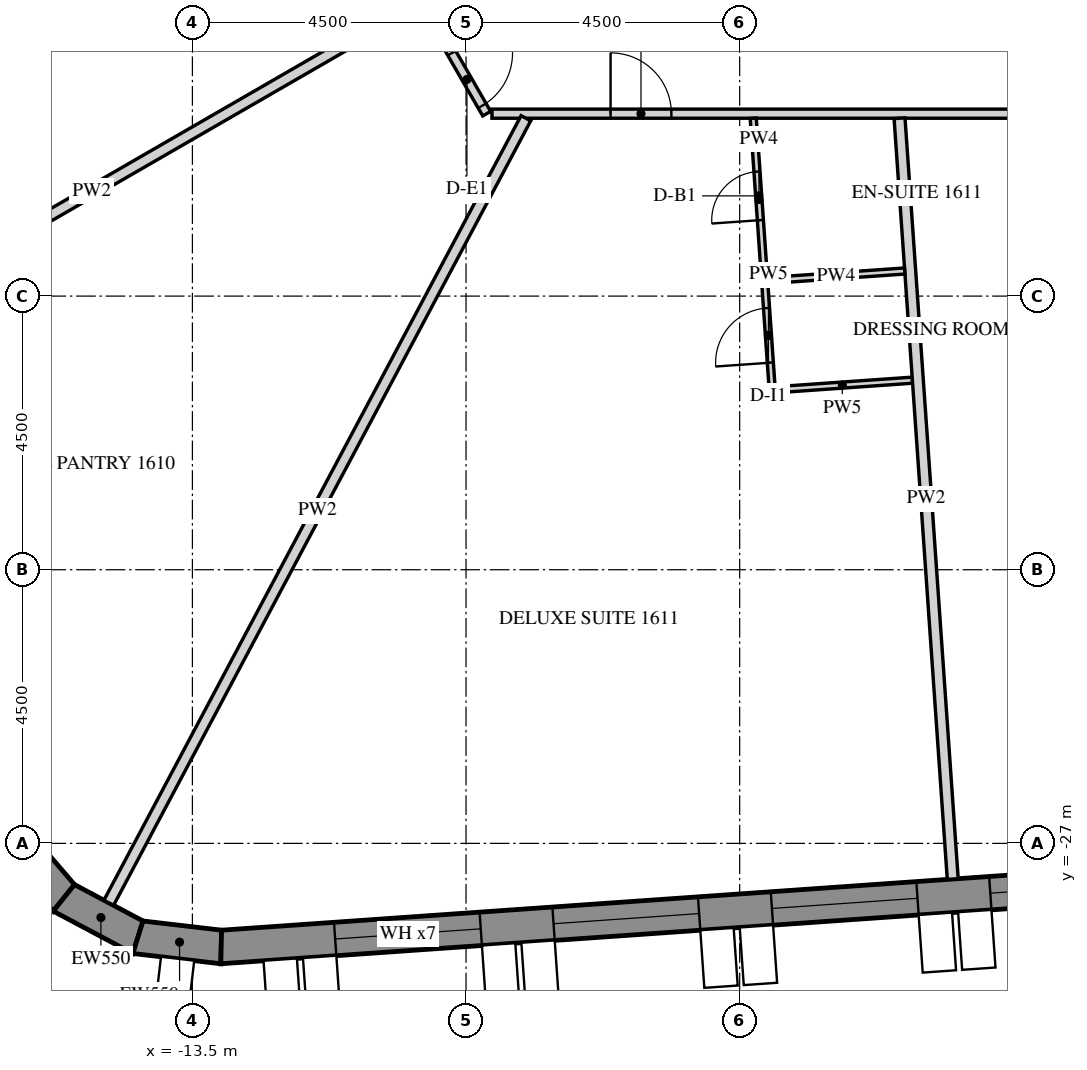
"""IFC4 building model, lengths in metres.
Left out: names, types, materials, properties, quantities, classifications, styles, units other than length and angle.
Written with IfcOpenShell. Run it as: python <this file> out.ifc"""

import sys

from ifc_helpers import new_model, si_unit, direction, frame, frame_2d, origin, place, context, subcontext, project, spatial, polyline, rectangle, outline, extrude, element, fill, save


model = new_model("IFC4")
c1 = context("Model", 3, precision=1e-05, world=origin(), true_north=direction((0.0, 1.0)))
c2 = subcontext(c1, "Body", "Model", "MODEL_VIEW")
j1 = project(units=[si_unit("LENGTHUNIT", "METRE"), si_unit("PLANEANGLEUNIT", "RADIAN")], contexts=[c1])
p1 = place(None, origin())
s1 = spatial("IfcSite", under=j1, at=p1, CompositionType="ELEMENT")
p2 = place(p1, origin())
s2 = spatial("IfcBuilding", under=s1, at=p2, CompositionType="ELEMENT")
p3 = place(p2, frame((0.0, 0.0, 207.3)))
s3 = spatial("IfcBuildingStorey", under=s2, at=p3, CompositionType="ELEMENT", Elevation=207.3)
p4 = place(p3, frame((-16.512, -26.85, -0.15), z_axis=(0.0, 0.0, 1.0), x_axis=(0.651621950847, -0.758543890078, 0.0)))
e1 = element("IfcWall", 1, at=p4, inside=s3, PredefinedType="SOLIDWALL", context=c2, shape_type="SweptSolid", body=[
    extrude(outline(polyline([(-0.026, -0.275), (1.431, -0.275), (1.327, 0.275), (0.026, 0.275), (-0.026, -0.275)])), origin(), (0.0, 0.0, 1.0), 3.9),
])
p5 = place(p3, frame((-15.614, -27.896, -0.15), z_axis=(0.0, 0.0, 1.0), x_axis=(0.882994189209, -0.469383917304, 0.0)))
e2 = element("IfcWall", 2, at=p5, inside=s3, PredefinedType="SOLIDWALL", context=c2, shape_type="SweptSolid", body=[
    extrude(outline(polyline([(-0.052, -0.275), (1.431, -0.275), (1.327, 0.275), (0.052, 0.275), (-0.052, -0.275)])), origin(), (0.0, 0.0, 1.0), 3.9),
])
p6 = place(p3, frame((-14.396, -28.543, -0.15), z_axis=(0.0, 0.0, 1.0), x_axis=(0.993232537394, -0.11614269956, 0.0)))
e3 = element("IfcWall", 3, at=p6, inside=s3, PredefinedType="SOLIDWALL", context=c2, shape_type="SweptSolid", body=[
    extrude(outline(polyline([(-0.052, -0.275), (1.405, -0.275), (1.353, 0.275), (0.052, 0.275), (-0.052, -0.275)])), origin(), (0.0, 0.0, 1.0), 3.9),
])
p7 = place(p3, frame((-13.026, -28.704, -0.15), z_axis=(0.0, 0.0, 1.0), x_axis=(0.99756406806, 0.069756219185, 0.0)))
e4 = element("IfcWall", 4, at=p7, inside=s3, PredefinedType="SOLIDWALL", context=c2, shape_type="SweptSolid", body=[
    extrude(outline(polyline([(-0.026, -0.275), (27.78, -0.275), (27.735, 0.275), (0.026, 0.275), (-0.026, -0.275)])), origin(), (0.0, 0.0, 1.0), 3.9),
])
p8 = place(p7, frame((1.879, 0.0, 1.05)))
e5 = element("IfcOpeningElement", 5, at=p8, cuts=e4, PredefinedType="OPENING", context=c2, shape_type="SweptSolid", body=[
    extrude(rectangle(XDim=2.4, YDim=2.4, at=frame_2d((1.2, 1.2))), frame((0.0, 0.285, 0.0), z_axis=(0.0, -1.0, 0.0), x_axis=(1.0, 0.0, 0.0)), (0.0, 0.0, 1.0), 0.57),
])
p9 = place(p7, frame((5.479, 0.0, 1.05)))
e6 = element("IfcOpeningElement", 6, at=p9, cuts=e4, PredefinedType="OPENING", context=c2, shape_type="SweptSolid", body=[
    extrude(rectangle(XDim=2.4, YDim=2.4, at=frame_2d((1.2, 1.2))), frame((0.0, 0.285, 0.0), z_axis=(0.0, -1.0, 0.0), x_axis=(1.0, 0.0, 0.0)), (0.0, 0.0, 1.0), 0.57),
])
p10 = place(p7, frame((9.079, 0.0, 1.05)))
e7 = element("IfcOpeningElement", 7, at=p10, cuts=e4, PredefinedType="OPENING", context=c2, shape_type="SweptSolid", body=[
    extrude(rectangle(XDim=2.4, YDim=2.4, at=frame_2d((1.2, 1.2))), frame((0.0, 0.285, 0.0), z_axis=(0.0, -1.0, 0.0), x_axis=(1.0, 0.0, 0.0)), (0.0, 0.0, 1.0), 0.57),
])
p11 = place(p7, frame((12.679, 0.0, 1.05)))
e8 = element("IfcOpeningElement", 8, at=p11, cuts=e4, PredefinedType="OPENING", context=c2, shape_type="SweptSolid", body=[
    extrude(rectangle(XDim=2.4, YDim=2.4, at=frame_2d((1.2, 1.2))), frame((0.0, 0.285, 0.0), z_axis=(0.0, -1.0, 0.0), x_axis=(1.0, 0.0, 0.0)), (0.0, 0.0, 1.0), 0.57),
])
p12 = place(p7, frame((16.279, 0.0, 1.05)))
e9 = element("IfcOpeningElement", 9, at=p12, cuts=e4, PredefinedType="OPENING", context=c2, shape_type="SweptSolid", body=[
    extrude(rectangle(XDim=2.4, YDim=2.4, at=frame_2d((1.2, 1.2))), frame((0.0, 0.285, 0.0), z_axis=(0.0, -1.0, 0.0), x_axis=(1.0, 0.0, 0.0)), (0.0, 0.0, 1.0), 0.57),
])
p13 = place(p7, frame((19.879, 0.0, 1.05)))
e10 = element("IfcOpeningElement", 10, at=p13, cuts=e4, PredefinedType="OPENING", context=c2, shape_type="SweptSolid", body=[
    extrude(rectangle(XDim=2.4, YDim=2.4, at=frame_2d((1.2, 1.2))), frame((0.0, 0.285, 0.0), z_axis=(0.0, -1.0, 0.0), x_axis=(1.0, 0.0, 0.0)), (0.0, 0.0, 1.0), 0.57),
])
p14 = place(p7, frame((23.479, 0.0, 1.05)))
e11 = element("IfcOpeningElement", 11, at=p14, cuts=e4, PredefinedType="OPENING", context=c2, shape_type="SweptSolid", body=[
    extrude(rectangle(XDim=2.4, YDim=2.4, at=frame_2d((1.2, 1.2))), frame((0.0, 0.285, 0.0), z_axis=(0.0, -1.0, 0.0), x_axis=(1.0, 0.0, 0.0)), (0.0, 0.0, 1.0), 0.57),
])
p15 = place(p3, frame((-15.094, -3.856, 0.0), z_axis=(0.0, 0.0, 1.0), x_axis=(0.500006037985, -0.866021917724, 0.0)))
e12 = element("IfcWall", 12, at=p15, inside=s3, PredefinedType="PARTITIONING", context=c2, shape_type="SweptSolid", body=[
    extrude(rectangle(XDim=12.867, YDim=0.15, at=frame_2d((6.434, 0.0))), origin(), (0.0, 0.0, 1.0), 2.988),
])
p16 = place(p15, frame((1.225, 0.0, 0.0)))
e13 = element("IfcOpeningElement", 13, at=p16, cuts=e12, PredefinedType="OPENING", context=c2, shape_type="SweptSolid", body=[
    extrude(rectangle(XDim=1.0, YDim=2.1, at=frame_2d((0.5, 1.05))), frame((0.0, 0.085, 0.0), z_axis=(0.0, -1.0, 0.0), x_axis=(1.0, 0.0, 0.0)), (0.0, 0.0, 1.0), 0.17),
])
p17 = place(p15, frame((8.025, 0.0, 0.0)))
e14 = element("IfcOpeningElement", 14, at=p17, cuts=e12, PredefinedType="OPENING", context=c2, shape_type="SweptSolid", body=[
    extrude(rectangle(XDim=1.0, YDim=2.1, at=frame_2d((0.5, 1.05))), frame((0.0, 0.085, 0.0), z_axis=(0.0, -1.0, 0.0), x_axis=(1.0, 0.0, 0.0)), (0.0, 0.0, 1.0), 0.17),
])
p18 = place(p15, frame((11.717, 0.0, 0.0)))
e15 = element("IfcOpeningElement", 15, at=p18, cuts=e12, PredefinedType="OPENING", context=c2, shape_type="SweptSolid", body=[
    extrude(rectangle(XDim=1.0, YDim=2.1, at=frame_2d((0.5, 1.05))), frame((0.0, 0.085, 0.0), z_axis=(0.0, -1.0, 0.0), x_axis=(1.0, 0.0, 0.0)), (0.0, 0.0, 1.0), 0.17),
])
p19 = place(p3, frame((-8.574, -15.0, 0.0), z_axis=(0.0, 0.0, 1.0), x_axis=(1.0, 0.0, 0.0)))
e16 = element("IfcWall", 16, at=p19, inside=s3, PredefinedType="PARTITIONING", context=c2, shape_type="SweptSolid", body=[
    extrude(rectangle(XDim=14.78, YDim=0.15, at=frame_2d((7.39, 0.0))), origin(), (0.0, 0.0, 1.0), 2.988),
])
p20 = place(p19, frame((1.951, 0.0, 0.0)))
e17 = element("IfcOpeningElement", 17, at=p20, cuts=e16, PredefinedType="OPENING", context=c2, shape_type="SweptSolid", body=[
    extrude(rectangle(XDim=1.0, YDim=2.1, at=frame_2d((0.5, 1.05))), frame((0.0, 0.085, 0.0), z_axis=(0.0, -1.0, 0.0), x_axis=(1.0, 0.0, 0.0)), (0.0, 0.0, 1.0), 0.17),
])
p21 = place(p19, frame((9.085, 0.0, 0.0)))
e18 = element("IfcOpeningElement", 18, at=p21, cuts=e16, PredefinedType="OPENING", context=c2, shape_type="SweptSolid", body=[
    extrude(rectangle(XDim=1.0, YDim=2.1, at=frame_2d((0.5, 1.05))), frame((0.0, 0.085, 0.0), z_axis=(0.0, -1.0, 0.0), x_axis=(1.0, 0.0, 0.0)), (0.0, 0.0, 1.0), 0.17),
])
p22 = place(p3, frame((-20.513, -19.37, 0.0), z_axis=(0.0, 0.0, 1.0), x_axis=(0.866024931941, 0.500000817256, 0.0)))
e19 = element("IfcWall", 19, at=p22, inside=s3, PredefinedType="PARTITIONING", context=c2, shape_type="SweptSolid", body=[
    extrude(rectangle(XDim=12.375, YDim=0.18, at=frame_2d((6.188, 0.0))), origin(), (0.0, 0.0, 1.0), 2.988),
])
p23 = place(p3, frame((-14.876, -27.977, 0.0), z_axis=(0.0, 0.0, 1.0), x_axis=(0.469468328163, 0.882949312731, 0.0)))
e20 = element("IfcWall", 20, at=p23, inside=s3, PredefinedType="PARTITIONING", context=c2, shape_type="SweptSolid", body=[
    extrude(rectangle(XDim=14.613, YDim=0.18, at=frame_2d((7.306, 0.0))), origin(), (0.0, 0.0, 1.0), 2.988),
])
p24 = place(p3, frame((-4.09, -17.748, 0.0), z_axis=(0.0, 0.0, 1.0), x_axis=(-0.069783798956, 0.997562139119, 0.0)))
e21 = element("IfcWall", 21, at=p24, inside=s3, PredefinedType="PARTITIONING", context=c2, shape_type="SweptSolid", body=[
    extrude(rectangle(XDim=2.68, YDim=0.1, at=frame_2d((1.34, 0.0))), origin(), (0.0, 0.0, 1.0), 2.988),
])
p25 = place(p24, frame((1.0, 0.0, 0.0)))
e22 = element("IfcOpeningElement", 22, at=p25, cuts=e21, PredefinedType="OPENING", context=c2, shape_type="SweptSolid", body=[
    extrude(rectangle(XDim=0.8, YDim=2.1, at=frame_2d((0.4, 1.05))), frame((0.0, 0.06, 0.0), z_axis=(0.0, -1.0, 0.0), x_axis=(1.0, 0.0, 0.0)), (0.0, 0.0, 1.0), 0.12),
])
p26 = place(p3, frame((-1.66, -19.383, 0.0), z_axis=(0.0, 0.0, 1.0), x_axis=(-0.997564338377, -0.069752353356, 0.0)))
e23 = element("IfcWall", 23, at=p26, inside=s3, PredefinedType="PARTITIONING", context=c2, shape_type="SweptSolid", body=[
    extrude(rectangle(XDim=2.31, YDim=0.1, at=frame_2d((1.155, 0.0))), origin(), (0.0, 0.0, 1.0), 2.988),
])
p27 = place(p3, frame((-3.968, -19.494, 0.0), z_axis=(0.0, 0.0, 1.0), x_axis=(-0.069797686069, 0.997561167558, 0.0)))
e24 = element("IfcWall", 24, at=p27, inside=s3, PredefinedType="PARTITIONING", context=c2, shape_type="SweptSolid", body=[
    extrude(rectangle(XDim=1.7, YDim=0.1, at=frame_2d((0.85, 0.0))), origin(), (0.0, 0.0, 1.0), 2.988),
])
p28 = place(p27, frame((0.4, 0.0, 0.0)))
e25 = element("IfcOpeningElement", 25, at=p28, cuts=e24, PredefinedType="OPENING", context=c2, shape_type="SweptSolid", body=[
    extrude(rectangle(XDim=0.9, YDim=2.1, at=frame_2d((0.45, 1.05))), frame((0.0, 0.06, 0.0), z_axis=(0.0, -1.0, 0.0), x_axis=(1.0, 0.0, 0.0)), (0.0, 0.0, 1.0), 0.12),
])
p29 = place(p3, frame((-0.996, -27.587, 0.0), z_axis=(0.0, 0.0, 1.0), x_axis=(-0.069744671963, 0.997564875451, 0.0)))
e26 = element("IfcWall", 26, at=p29, inside=s3, PredefinedType="PARTITIONING", context=c2, shape_type="SweptSolid", body=[
    extrude(rectangle(XDim=12.542, YDim=0.18, at=frame_2d((6.271, 0.0))), origin(), (0.0, 0.0, 1.0), 2.988),
])
p30 = place(p3, frame((-4.04, -17.745, 0.0), z_axis=(0.0, 0.0, 1.0), x_axis=(0.997562351999, 0.069780755754, 0.0)))
e27 = element("IfcWall", 27, at=p30, inside=s3, PredefinedType="PARTITIONING", context=c2, shape_type="SweptSolid", body=[
    extrude(rectangle(XDim=2.26, YDim=0.1, at=frame_2d((1.13, 0.0))), origin(), (0.0, 0.0, 1.0), 2.988),
])
p31 = place(p8, frame((0.0, 0.205, 0.0)))
e28 = element("IfcWindow", 28, at=p31, inside=s3, PartitioningType="DOUBLE_PANEL_VERTICAL", PredefinedType="WINDOW", context=c2, shape_type="SweptSolid", body=[
    extrude(rectangle(XDim=2.4, YDim=2.4, at=frame_2d((1.2, 1.2))), frame((0.0, 0.03, 0.0), z_axis=(0.0, -1.0, 0.0), x_axis=(1.0, 0.0, 0.0)), (0.0, 0.0, 1.0), 0.06),
])
fill(e5, e28)
p32 = place(p9, frame((0.0, 0.205, 0.0)))
e29 = element("IfcWindow", 29, at=p32, inside=s3, PartitioningType="DOUBLE_PANEL_VERTICAL", PredefinedType="WINDOW", context=c2, shape_type="SweptSolid", body=[
    extrude(rectangle(XDim=2.4, YDim=2.4, at=frame_2d((1.2, 1.2))), frame((0.0, 0.03, 0.0), z_axis=(0.0, -1.0, 0.0), x_axis=(1.0, 0.0, 0.0)), (0.0, 0.0, 1.0), 0.06),
])
fill(e6, e29)
p33 = place(p10, frame((0.0, 0.205, 0.0)))
e30 = element("IfcWindow", 30, at=p33, inside=s3, PartitioningType="DOUBLE_PANEL_VERTICAL", PredefinedType="WINDOW", context=c2, shape_type="SweptSolid", body=[
    extrude(rectangle(XDim=2.4, YDim=2.4, at=frame_2d((1.2, 1.2))), frame((0.0, 0.03, 0.0), z_axis=(0.0, -1.0, 0.0), x_axis=(1.0, 0.0, 0.0)), (0.0, 0.0, 1.0), 0.06),
])
fill(e7, e30)
p34 = place(p11, frame((0.0, 0.205, 0.0)))
e31 = element("IfcWindow", 31, at=p34, inside=s3, PartitioningType="DOUBLE_PANEL_VERTICAL", PredefinedType="WINDOW", context=c2, shape_type="SweptSolid", body=[
    extrude(rectangle(XDim=2.4, YDim=2.4, at=frame_2d((1.2, 1.2))), frame((0.0, 0.03, 0.0), z_axis=(0.0, -1.0, 0.0), x_axis=(1.0, 0.0, 0.0)), (0.0, 0.0, 1.0), 0.06),
])
fill(e8, e31)
p35 = place(p18, origin())
e32 = element("IfcDoor", 32, at=p35, inside=s3, OperationType="SINGLE_SWING_LEFT", PredefinedType="DOOR", context=c2, shape_type="SweptSolid", body=[
    extrude(rectangle(XDim=1.0, YDim=2.1, at=frame_2d((0.5, 1.05))), frame((0.0, 0.025, 0.0), z_axis=(0.0, -1.0, 0.0), x_axis=(1.0, 0.0, 0.0)), (0.0, 0.0, 1.0), 0.05),
])
fill(e15, e32)
p36 = place(p20, origin())
e33 = element("IfcDoor", 33, at=p36, inside=s3, OperationType="SINGLE_SWING_LEFT", PredefinedType="DOOR", context=c2, shape_type="SweptSolid", body=[
    extrude(rectangle(XDim=1.0, YDim=2.1, at=frame_2d((0.5, 1.05))), frame((0.0, 0.025, 0.0), z_axis=(0.0, -1.0, 0.0), x_axis=(1.0, 0.0, 0.0)), (0.0, 0.0, 1.0), 0.05),
])
fill(e17, e33)
p37 = place(p25, origin())
e34 = element("IfcDoor", 34, at=p37, inside=s3, OperationType="SINGLE_SWING_LEFT", PredefinedType="DOOR", context=c2, shape_type="SweptSolid", body=[
    extrude(rectangle(XDim=0.8, YDim=2.1, at=frame_2d((0.4, 1.05))), frame((0.0, 0.025, 0.0), z_axis=(0.0, -1.0, 0.0), x_axis=(1.0, 0.0, 0.0)), (0.0, 0.0, 1.0), 0.05),
])
fill(e22, e34)
p38 = place(p28, origin())
e35 = element("IfcDoor", 35, at=p38, inside=s3, OperationType="SINGLE_SWING_RIGHT", PredefinedType="DOOR", context=c2, shape_type="SweptSolid", body=[
    extrude(rectangle(XDim=0.9, YDim=2.1, at=frame_2d((0.45, 1.05))), frame((0.0, 0.025, 0.0), z_axis=(0.0, -1.0, 0.0), x_axis=(1.0, 0.0, 0.0)), (0.0, 0.0, 1.0), 0.05),
])
fill(e25, e35)
save(model, sys.argv[1])
